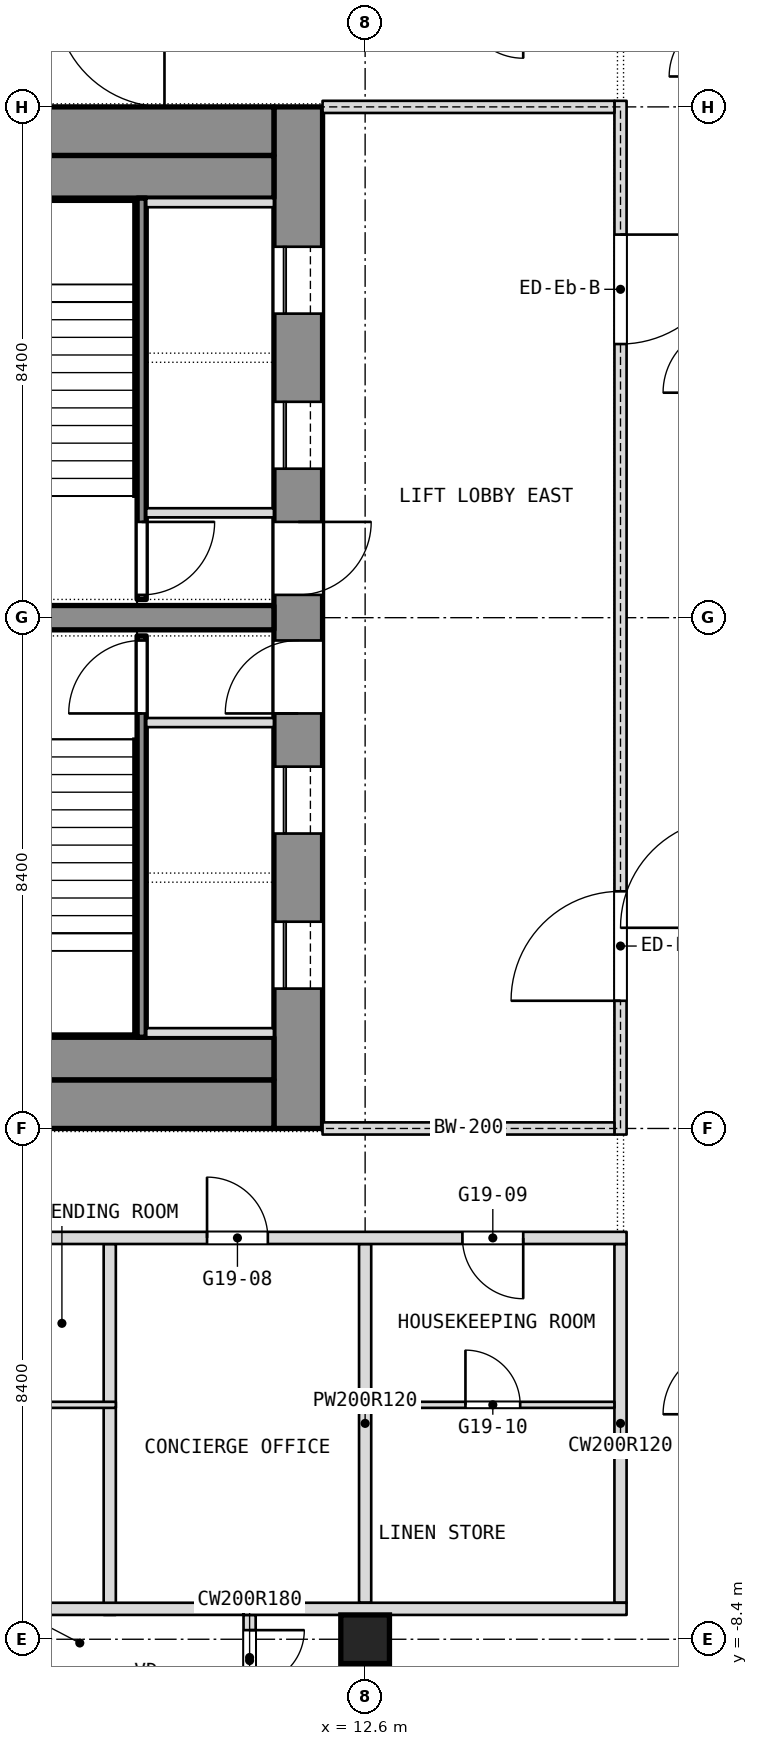
"""IFC4 building model, lengths in metres.
Left out: names, types, materials, properties, quantities, classifications, styles, units other than length and angle.
Written with IfcOpenShell. Run it as: python <this file> out.ifc"""

import sys

from ifc_helpers import new_model, si_unit, direction, frame, frame_2d, origin, origin_2d, place, context, subcontext, project, spatial, rectangle, extrude, element, fill, save


model = new_model("IFC4")
c1 = context("Model", 3, precision=1e-05, world=origin(), true_north=direction((0.0, 1.0)))
c2 = subcontext(c1, "Body", "Model", "MODEL_VIEW")
j1 = project(units=[si_unit("LENGTHUNIT", "METRE"), si_unit("PLANEANGLEUNIT", "RADIAN")], contexts=[c1])
p1 = place(None, origin())
s1 = spatial("IfcSite", under=j1, at=p1, CompositionType="ELEMENT")
p2 = place(p1, origin())
s2 = spatial("IfcBuilding", under=s1, at=p2, CompositionType="ELEMENT")
p3 = place(p2, frame((0.0, 0.0, 220.1)))
s3 = spatial("IfcBuildingStorey", under=s2, at=p3, CompositionType="ELEMENT", Elevation=220.1)
p4 = place(p3, frame((11.5, 0.0, 0.0), z_axis=(0.0, 0.0, 1.0), x_axis=(0.0, 1.0, 0.0)))
e1 = element("IfcWall", 1, at=p4, inside=s3, PredefinedType="SHEAR", context=c2, shape_type="SweptSolid", body=[
    extrude(rectangle(XDim=16.8, YDim=0.8, at=frame_2d((8.4, 0.0))), origin(), (0.0, 0.0, 1.0), 3.6),
])
p5 = place(p4, frame((2.3, 0.0, 0.0)))
e2 = element("IfcOpeningElement", 2, at=p5, cuts=e1, PredefinedType="OPENING", context=c2, shape_type="SweptSolid", body=[
    extrude(rectangle(XDim=1.1, YDim=2.1, at=frame_2d((0.55, 1.05))), frame((0.0, 0.4, 0.0), z_axis=(0.0, -1.0, 0.0), x_axis=(1.0, 0.0, 0.0)), (0.0, 0.0, 1.0), 0.8),
])
p6 = place(p4, frame((4.85, 0.0, 0.0)))
e3 = element("IfcOpeningElement", 3, at=p6, cuts=e1, PredefinedType="OPENING", context=c2, shape_type="SweptSolid", body=[
    extrude(rectangle(XDim=1.1, YDim=2.1, at=frame_2d((0.55, 1.05))), frame((0.0, 0.4, 0.0), z_axis=(0.0, -1.0, 0.0), x_axis=(1.0, 0.0, 0.0)), (0.0, 0.0, 1.0), 0.8),
])
p7 = place(p4, frame((6.825, 0.0, 0.0)))
e4 = element("IfcOpeningElement", 4, at=p7, cuts=e1, PredefinedType="OPENING", context=c2, shape_type="SweptSolid", body=[
    extrude(rectangle(XDim=1.2, YDim=2.1, at=frame_2d((0.6, 1.05))), frame((0.0, 0.4, 0.0), z_axis=(0.0, -1.0, 0.0), x_axis=(1.0, 0.0, 0.0)), (0.0, 0.0, 1.0), 0.8),
])
p8 = place(p4, frame((13.4, 0.0, 0.0)))
e5 = element("IfcOpeningElement", 5, at=p8, cuts=e1, PredefinedType="OPENING", context=c2, shape_type="SweptSolid", body=[
    extrude(rectangle(XDim=1.1, YDim=2.1, at=frame_2d((0.55, 1.05))), frame((0.0, 0.4, 0.0), z_axis=(0.0, -1.0, 0.0), x_axis=(1.0, 0.0, 0.0)), (0.0, 0.0, 1.0), 0.8),
])
p9 = place(p4, frame((10.85, 0.0, 0.0)))
e6 = element("IfcOpeningElement", 6, at=p9, cuts=e1, PredefinedType="OPENING", context=c2, shape_type="SweptSolid", body=[
    extrude(rectangle(XDim=1.1, YDim=2.1, at=frame_2d((0.55, 1.05))), frame((0.0, 0.4, 0.0), z_axis=(0.0, -1.0, 0.0), x_axis=(1.0, 0.0, 0.0)), (0.0, 0.0, 1.0), 0.8),
])
p10 = place(p4, frame((8.775, 0.0, 0.0)))
e7 = element("IfcOpeningElement", 7, at=p10, cuts=e1, PredefinedType="OPENING", context=c2, shape_type="SweptSolid", body=[
    extrude(rectangle(XDim=1.2, YDim=2.1, at=frame_2d((0.6, 1.05))), frame((0.0, 0.4, 0.0), z_axis=(0.0, -1.0, 0.0), x_axis=(1.0, 0.0, 0.0)), (0.0, 0.0, 1.0), 0.8),
])
for number, where, z_axis, x_axis in (
    (8, (-11.1, 0.4, 0.0), (0.0, 0.0, 1.0), (1.0, 0.0, 0.0)),
    (9, (-11.1, 16.4, 0.0), (0.0, 0.0, 1.0), (1.0, 0.0, 0.0)),
):
    element("IfcWall", number, at=place(p3, frame(where, z_axis=z_axis, x_axis=x_axis)), inside=s3, PredefinedType="SHEAR", context=c2, shape_type="SweptSolid", body=[
        extrude(rectangle(XDim=22.2, YDim=0.8, at=frame_2d((11.1, 0.0))), origin(), (0.0, 0.0, 1.0), 3.6),
    ])
p11 = place(p3, frame((4.4, 8.4, 0.0), z_axis=(0.0, 0.0, 1.0), x_axis=(1.0, 0.0, 0.0)))
e10 = element("IfcWall", 10, at=p11, inside=s3, PredefinedType="SHEAR", context=c2, shape_type="SweptSolid", body=[
    extrude(rectangle(XDim=6.7, YDim=0.4, at=frame_2d((3.35, 0.0))), origin(), (0.0, 0.0, 1.0), 3.6),
])
p12 = place(p3, frame((12.6, -8.4, 0.0), z_axis=(0.0, 0.0, 1.0), x_axis=(1.0, 0.0, 0.0)))
e11 = element("IfcColumn", 11, at=p12, inside=s3, PredefinedType="COLUMN", context=c2, shape_type="SweptSolid", body=[
    extrude(rectangle(XDim=0.8, YDim=0.8, at=origin_2d()), origin(), (0.0, 0.0, 1.0), 3.6),
])
for number, where, z_axis, x_axis in (
    (12, (16.8, -7.8, 0.0), (0.0, 0.0, 1.0), (0.0, 1.0, 0.0)),
    (13, (12.6, -7.8, 0.0), (0.0, 0.0, 1.0), (0.0, 1.0, 0.0)),
):
    element("IfcWall", number, at=place(p3, frame(where, z_axis=z_axis, x_axis=x_axis)), inside=s3, PredefinedType="PARTITIONING", context=c2, shape_type="SweptSolid", body=[
        extrude(rectangle(XDim=5.9, YDim=0.2, at=frame_2d((2.95, 0.0))), origin(), (0.0, 0.0, 1.0), 3.34),
    ])
p13 = place(p3, frame((10.7, -9.5, 0.0), z_axis=(0.0, 0.0, 1.0), x_axis=(0.0, 1.0, 0.0)))
e14 = element("IfcWall", 14, at=p13, inside=s3, PredefinedType="PARTITIONING", context=c2, shape_type="SweptSolid", body=[
    extrude(rectangle(XDim=1.5, YDim=0.2, at=frame_2d((0.75, 0.0))), origin(), (0.0, 0.0, 1.0), 3.34),
])
p14 = place(p13, frame((0.35, 0.0, 0.0)))
e15 = element("IfcOpeningElement", 15, at=p14, cuts=e14, PredefinedType="OPENING", context=c2, shape_type="SweptSolid", body=[
    extrude(rectangle(XDim=0.9, YDim=2.1, at=frame_2d((0.45, 1.05))), frame((0.0, 0.1, 0.0), z_axis=(0.0, -1.0, 0.0), x_axis=(1.0, 0.0, 0.0)), (0.0, 0.0, 1.0), 0.2),
])
p15 = place(p3, frame((8.4, -8.0, 0.0), z_axis=(0.0, 0.0, 1.0), x_axis=(0.0, 1.0, 0.0)))
e16 = element("IfcWall", 16, at=p15, inside=s3, PredefinedType="PARTITIONING", context=c2, shape_type="SweptSolid", body=[
    extrude(rectangle(XDim=6.1, YDim=0.2, at=frame_2d((3.05, 0.0))), origin(), (0.0, 0.0, 1.0), 3.34),
])
p16 = place(p3, frame((10.6, -7.9, 0.0), z_axis=(0.0, 0.0, 1.0), x_axis=(1.0, 0.0, 0.0)))
e17 = element("IfcWall", 17, at=p16, inside=s3, PredefinedType="PARTITIONING", context=c2, shape_type="SweptSolid", body=[
    extrude(rectangle(XDim=6.3, YDim=0.2, at=frame_2d((3.15, 0.0))), origin(), (0.0, 0.0, 1.0), 3.34),
])
p17 = place(p3, frame((7.2, -7.9, 0.0), z_axis=(0.0, 0.0, 1.0), x_axis=(1.0, 0.0, 0.0)))
e18 = element("IfcWall", 18, at=p17, inside=s3, PredefinedType="PARTITIONING", context=c2, shape_type="SweptSolid", body=[
    extrude(rectangle(XDim=3.4, YDim=0.2, at=frame_2d((1.7, 0.0))), origin(), (0.0, 0.0, 1.0), 3.34),
])
p18 = place(p3, frame((4.1, -4.545, 0.0), z_axis=(0.0, 0.0, 1.0), x_axis=(1.0, 0.0, 0.0)))
e19 = element("IfcWall", 19, at=p18, inside=s3, PredefinedType="PARTITIONING", context=c2, shape_type="SweptSolid", body=[
    extrude(rectangle(XDim=4.4, YDim=0.1, at=frame_2d((2.2, 0.0))), origin(), (0.0, 0.0, 1.0), 3.34),
])
p19 = place(p18, frame((1.75, 0.0, 0.0)))
e20 = element("IfcOpeningElement", 20, at=p19, cuts=e19, PredefinedType="OPENING", context=c2, shape_type="SweptSolid", body=[
    extrude(rectangle(XDim=0.9, YDim=2.1, at=frame_2d((0.45, 1.05))), frame((0.0, 0.05, 0.0), z_axis=(0.0, -1.0, 0.0), x_axis=(1.0, 0.0, 0.0)), (0.0, 0.0, 1.0), 0.1),
])
p20 = place(p3, frame((12.7, -4.545, 0.0), z_axis=(0.0, 0.0, 1.0), x_axis=(1.0, 0.0, 0.0)))
e21 = element("IfcWall", 21, at=p20, inside=s3, PredefinedType="PARTITIONING", context=c2, shape_type="SweptSolid", body=[
    extrude(rectangle(XDim=4.0, YDim=0.1, at=frame_2d((2.0, 0.0))), origin(), (0.0, 0.0, 1.0), 3.34),
])
p21 = place(p20, frame((1.55, 0.0, 0.0)))
e22 = element("IfcOpeningElement", 22, at=p21, cuts=e21, PredefinedType="OPENING", context=c2, shape_type="SweptSolid", body=[
    extrude(rectangle(XDim=0.9, YDim=2.1, at=frame_2d((0.45, 1.05))), frame((0.0, 0.05, 0.0), z_axis=(0.0, -1.0, 0.0), x_axis=(1.0, 0.0, 0.0)), (0.0, 0.0, 1.0), 0.1),
])
p22 = place(p3, frame((-16.9, -1.8, 0.0), z_axis=(0.0, 0.0, 1.0), x_axis=(1.0, 0.0, 0.0)))
e23 = element("IfcWall", 23, at=p22, inside=s3, PredefinedType="PARTITIONING", context=c2, shape_type="SweptSolid", body=[
    extrude(rectangle(XDim=33.8, YDim=0.2, at=frame_2d((16.9, 0.0))), origin(), (0.0, 0.0, 1.0), 3.34),
])
p23 = place(p22, frame((1.7, 0.0, 0.0)))
e24 = element("IfcOpeningElement", 24, at=p23, cuts=e23, PredefinedType="OPENING", context=c2, shape_type="SweptSolid", body=[
    extrude(rectangle(XDim=1.0, YDim=2.1, at=frame_2d((0.5, 1.05))), frame((0.0, 0.1, 0.0), z_axis=(0.0, -1.0, 0.0), x_axis=(1.0, 0.0, 0.0)), (0.0, 0.0, 1.0), 0.2),
])
p24 = place(p22, frame((5.9, 0.0, 0.0)))
e25 = element("IfcOpeningElement", 25, at=p24, cuts=e23, PredefinedType="OPENING", context=c2, shape_type="SweptSolid", body=[
    extrude(rectangle(XDim=1.0, YDim=2.1, at=frame_2d((0.5, 1.05))), frame((0.0, 0.1, 0.0), z_axis=(0.0, -1.0, 0.0), x_axis=(1.0, 0.0, 0.0)), (0.0, 0.0, 1.0), 0.2),
])
p25 = place(p22, frame((10.1, 0.0, 0.0)))
e26 = element("IfcOpeningElement", 26, at=p25, cuts=e23, PredefinedType="OPENING", context=c2, shape_type="SweptSolid", body=[
    extrude(rectangle(XDim=1.0, YDim=2.1, at=frame_2d((0.5, 1.05))), frame((0.0, 0.1, 0.0), z_axis=(0.0, -1.0, 0.0), x_axis=(1.0, 0.0, 0.0)), (0.0, 0.0, 1.0), 0.2),
])
p26 = place(p22, frame((22.7, 0.0, 0.0)))
e27 = element("IfcOpeningElement", 27, at=p26, cuts=e23, PredefinedType="OPENING", context=c2, shape_type="SweptSolid", body=[
    extrude(rectangle(XDim=1.0, YDim=2.1, at=frame_2d((0.5, 1.05))), frame((0.0, 0.1, 0.0), z_axis=(0.0, -1.0, 0.0), x_axis=(1.0, 0.0, 0.0)), (0.0, 0.0, 1.0), 0.2),
])
p27 = place(p22, frame((26.9, 0.0, 0.0)))
e28 = element("IfcOpeningElement", 28, at=p27, cuts=e23, PredefinedType="OPENING", context=c2, shape_type="SweptSolid", body=[
    extrude(rectangle(XDim=1.0, YDim=2.1, at=frame_2d((0.5, 1.05))), frame((0.0, 0.1, 0.0), z_axis=(0.0, -1.0, 0.0), x_axis=(1.0, 0.0, 0.0)), (0.0, 0.0, 1.0), 0.2),
])
p28 = place(p22, frame((31.1, 0.0, 0.0)))
e29 = element("IfcOpeningElement", 29, at=p28, cuts=e23, PredefinedType="OPENING", context=c2, shape_type="SweptSolid", body=[
    extrude(rectangle(XDim=1.0, YDim=2.1, at=frame_2d((0.5, 1.05))), frame((0.0, 0.1, 0.0), z_axis=(0.0, -1.0, 0.0), x_axis=(1.0, 0.0, 0.0)), (0.0, 0.0, 1.0), 0.2),
])
p29 = place(p22, frame((16.4, 0.0, 0.0)))
e30 = element("IfcOpeningElement", 30, at=p29, cuts=e23, PredefinedType="OPENING", context=c2, shape_type="SweptSolid", body=[
    extrude(rectangle(XDim=1.0, YDim=2.1, at=frame_2d((0.5, 1.05))), frame((0.0, 0.1, 0.0), z_axis=(0.0, -1.0, 0.0), x_axis=(1.0, 0.0, 0.0)), (0.0, 0.0, 1.0), 0.2),
])
for number, where, z_axis, x_axis in (
    (31, (-11.1, 1.15, 0.0), (0.0, 0.0, 1.0), (1.0, 0.0, 0.0)),
    (32, (-11.1, 15.65, 0.0), (0.0, 0.0, 1.0), (1.0, 0.0, 0.0)),
):
    element("IfcWall", number, at=place(p3, frame(where, z_axis=z_axis, x_axis=x_axis)), inside=s3, PredefinedType="PARTITIONING", context=c2, shape_type="SweptSolid", body=[
        extrude(rectangle(XDim=22.2, YDim=0.7, at=frame_2d((11.1, 0.0))), origin(), (0.0, 0.0, 1.0), 3.34),
    ])
p30 = place(p3, frame((8.925, 1.5, 0.0), z_axis=(0.0, 0.0, 1.0), x_axis=(0.0, 1.0, 0.0)))
e33 = element("IfcWall", 33, at=p30, inside=s3, PredefinedType="SHEAR", context=c2, shape_type="SweptSolid", body=[
    extrude(rectangle(XDim=6.6, YDim=0.15, at=frame_2d((3.3, 0.0))), origin(), (0.0, 0.0, 1.0), 3.34),
])
p31 = place(p30, frame((5.325, 0.0, 0.0)))
e34 = element("IfcOpeningElement", 34, at=p31, cuts=e33, PredefinedType="OPENING", context=c2, shape_type="SweptSolid", body=[
    extrude(rectangle(XDim=1.2, YDim=2.1, at=frame_2d((0.6, 1.05))), frame((0.0, 0.075, 0.0), z_axis=(0.0, -1.0, 0.0), x_axis=(1.0, 0.0, 0.0)), (0.0, 0.0, 1.0), 0.15),
])
for number, where, z_axis, x_axis in (
    (35, (9.0, 6.675, 0.0), (0.0, 0.0, 1.0), (1.0, 0.0, 0.0)),
    (36, (9.0, 1.575, 0.0), (0.0, 0.0, 1.0), (1.0, 0.0, 0.0)),
):
    element("IfcWall", number, at=place(p3, frame(where, z_axis=z_axis, x_axis=x_axis)), inside=s3, PredefinedType="SHEAR", context=c2, shape_type="SweptSolid", body=[
        extrude(rectangle(XDim=2.1, YDim=0.15, at=frame_2d((1.05, 0.0))), origin(), (0.0, 0.0, 1.0), 3.6),
    ])
p32 = place(p3, frame((8.925, 8.7, 0.0), z_axis=(0.0, 0.0, 1.0), x_axis=(0.0, 1.0, 0.0)))
e37 = element("IfcWall", 37, at=p32, inside=s3, PredefinedType="SHEAR", context=c2, shape_type="SweptSolid", body=[
    extrude(rectangle(XDim=6.6, YDim=0.15, at=frame_2d((3.3, 0.0))), origin(), (0.0, 0.0, 1.0), 3.34),
])
p33 = place(p32, frame((0.075, 0.0, 0.0)))
e38 = element("IfcOpeningElement", 38, at=p33, cuts=e37, PredefinedType="OPENING", context=c2, shape_type="SweptSolid", body=[
    extrude(rectangle(XDim=1.2, YDim=2.1, at=frame_2d((0.6, 1.05))), frame((0.0, 0.075, 0.0), z_axis=(0.0, -1.0, 0.0), x_axis=(1.0, 0.0, 0.0)), (0.0, 0.0, 1.0), 0.15),
])
for number, where, z_axis, x_axis in (
    (39, (9.0, 10.125, 0.0), (0.0, 0.0, 1.0), (1.0, 0.0, 0.0)),
    (40, (9.0, 15.225, 0.0), (0.0, 0.0, 1.0), (1.0, 0.0, 0.0)),
):
    element("IfcWall", number, at=place(p3, frame(where, z_axis=z_axis, x_axis=x_axis)), inside=s3, PredefinedType="SHEAR", context=c2, shape_type="SweptSolid", body=[
        extrude(rectangle(XDim=2.1, YDim=0.15, at=frame_2d((1.05, 0.0))), origin(), (0.0, 0.0, 1.0), 3.6),
    ])
p34 = place(p3, frame((16.8, -0.1, 0.0), z_axis=(0.0, 0.0, 1.0), x_axis=(0.0, 1.0, 0.0)))
e41 = element("IfcWall", 41, at=p34, inside=s3, PredefinedType="PARTITIONING", context=c2, shape_type="SweptSolid", body=[
    extrude(rectangle(XDim=17.0, YDim=0.2, at=frame_2d((8.5, 0.0))), origin(), (0.0, 0.0, 1.0), 3.34),
])
p35 = place(p34, frame((2.2, 0.0, 0.0)))
e42 = element("IfcOpeningElement", 42, at=p35, cuts=e41, PredefinedType="OPENING", context=c2, shape_type="SweptSolid", body=[
    extrude(rectangle(XDim=1.8, YDim=2.1, at=frame_2d((0.9, 1.05))), frame((0.0, 0.1, 0.0), z_axis=(0.0, -1.0, 0.0), x_axis=(1.0, 0.0, 0.0)), (0.0, 0.0, 1.0), 0.2),
])
p36 = place(p34, frame((13.0, 0.0, 0.0)))
e43 = element("IfcOpeningElement", 43, at=p36, cuts=e41, PredefinedType="OPENING", context=c2, shape_type="SweptSolid", body=[
    extrude(rectangle(XDim=1.8, YDim=2.1, at=frame_2d((0.9, 1.05))), frame((0.0, 0.1, 0.0), z_axis=(0.0, -1.0, 0.0), x_axis=(1.0, 0.0, 0.0)), (0.0, 0.0, 1.0), 0.2),
])
for number, where, z_axis, x_axis in (
    (44, (11.9, 0.0, 0.0), (0.0, 0.0, 1.0), (1.0, 0.0, 0.0)),
    (45, (11.9, 16.8, 0.0), (0.0, 0.0, 1.0), (1.0, 0.0, 0.0)),
):
    element("IfcWall", number, at=place(p3, frame(where, z_axis=z_axis, x_axis=x_axis)), inside=s3, PredefinedType="PARTITIONING", context=c2, shape_type="SweptSolid", body=[
        extrude(rectangle(XDim=4.8, YDim=0.2, at=frame_2d((2.4, 0.0))), origin(), (0.0, 0.0, 1.0), 2.94),
    ])
p37 = place(p14, origin())
e46 = element("IfcDoor", 46, at=p37, inside=s3, OperationType="SINGLE_SWING_RIGHT", PredefinedType="DOOR", context=c2, shape_type="SweptSolid", body=[
    extrude(rectangle(XDim=0.9, YDim=2.1, at=frame_2d((0.45, 1.05))), frame((0.0, 0.025, 0.0), z_axis=(0.0, -1.0, 0.0), x_axis=(1.0, 0.0, 0.0)), (0.0, 0.0, 1.0), 0.05),
])
fill(e15, e46)
p38 = place(p21, origin())
e47 = element("IfcDoor", 47, at=p38, inside=s3, OperationType="SINGLE_SWING_RIGHT", PredefinedType="DOOR", context=c2, shape_type="SweptSolid", body=[
    extrude(rectangle(XDim=0.9, YDim=2.1, at=frame_2d((0.45, 1.05))), frame((0.0, 0.025, 0.0), z_axis=(0.0, -1.0, 0.0), x_axis=(1.0, 0.0, 0.0)), (0.0, 0.0, 1.0), 0.05),
])
fill(e22, e47)
p39 = place(p27, origin())
e48 = element("IfcDoor", 48, at=p39, inside=s3, OperationType="SINGLE_SWING_LEFT", PredefinedType="DOOR", context=c2, shape_type="SweptSolid", body=[
    extrude(rectangle(XDim=1.0, YDim=2.1, at=frame_2d((0.5, 1.05))), frame((0.0, 0.025, 0.0), z_axis=(0.0, -1.0, 0.0), x_axis=(1.0, 0.0, 0.0)), (0.0, 0.0, 1.0), 0.05),
])
fill(e28, e48)
p40 = place(p28, origin())
e49 = element("IfcDoor", 49, at=p40, inside=s3, OperationType="SINGLE_SWING_LEFT", PredefinedType="DOOR", context=c2, shape_type="SweptSolid", body=[
    extrude(rectangle(XDim=1.0, YDim=2.1, at=frame_2d((0.5, 1.05))), frame((0.0, 0.025, 0.0), z_axis=(0.0, -1.0, 0.0), x_axis=(1.0, 0.0, 0.0)), (0.0, 0.0, 1.0), 0.05),
])
fill(e29, e49)
p41 = place(p5, origin())
e50 = element("IfcDoor", 50, at=p41, inside=s3, OperationType="SLIDING_TO_LEFT", PredefinedType="DOOR", context=c2, shape_type="SweptSolid", body=[
    extrude(rectangle(XDim=1.1, YDim=2.1, at=frame_2d((0.55, 1.05))), frame((0.0, 0.025, 0.0), z_axis=(0.0, -1.0, 0.0), x_axis=(1.0, 0.0, 0.0)), (0.0, 0.0, 1.0), 0.05),
])
fill(e2, e50)
p42 = place(p6, origin())
e51 = element("IfcDoor", 51, at=p42, inside=s3, OperationType="SLIDING_TO_LEFT", PredefinedType="DOOR", context=c2, shape_type="SweptSolid", body=[
    extrude(rectangle(XDim=1.1, YDim=2.1, at=frame_2d((0.55, 1.05))), frame((0.0, 0.025, 0.0), z_axis=(0.0, -1.0, 0.0), x_axis=(1.0, 0.0, 0.0)), (0.0, 0.0, 1.0), 0.05),
])
fill(e3, e51)
p43 = place(p7, origin())
e52 = element("IfcDoor", 52, at=p43, inside=s3, OperationType="SINGLE_SWING_LEFT", PredefinedType="DOOR", context=c2, shape_type="SweptSolid", body=[
    extrude(rectangle(XDim=1.2, YDim=2.1, at=frame_2d((0.6, 1.05))), frame((0.0, 0.025, 0.0), z_axis=(0.0, -1.0, 0.0), x_axis=(1.0, 0.0, 0.0)), (0.0, 0.0, 1.0), 0.05),
])
fill(e4, e52)
p44 = place(p31, origin())
e53 = element("IfcDoor", 53, at=p44, inside=s3, OperationType="SINGLE_SWING_LEFT", PredefinedType="DOOR", context=c2, shape_type="SweptSolid", body=[
    extrude(rectangle(XDim=1.2, YDim=2.1, at=frame_2d((0.6, 1.05))), frame((0.0, 0.025, 0.0), z_axis=(0.0, -1.0, 0.0), x_axis=(1.0, 0.0, 0.0)), (0.0, 0.0, 1.0), 0.05),
])
fill(e34, e53)
p45 = place(p8, origin())
e54 = element("IfcDoor", 54, at=p45, inside=s3, OperationType="SLIDING_TO_LEFT", PredefinedType="DOOR", context=c2, shape_type="SweptSolid", body=[
    extrude(rectangle(XDim=1.1, YDim=2.1, at=frame_2d((0.55, 1.05))), frame((0.0, 0.025, 0.0), z_axis=(0.0, -1.0, 0.0), x_axis=(1.0, 0.0, 0.0)), (0.0, 0.0, 1.0), 0.05),
])
fill(e5, e54)
p46 = place(p9, origin())
e55 = element("IfcDoor", 55, at=p46, inside=s3, OperationType="SLIDING_TO_LEFT", PredefinedType="DOOR", context=c2, shape_type="SweptSolid", body=[
    extrude(rectangle(XDim=1.1, YDim=2.1, at=frame_2d((0.55, 1.05))), frame((0.0, 0.025, 0.0), z_axis=(0.0, -1.0, 0.0), x_axis=(1.0, 0.0, 0.0)), (0.0, 0.0, 1.0), 0.05),
])
fill(e6, e55)
p47 = place(p10, origin())
e56 = element("IfcDoor", 56, at=p47, inside=s3, OperationType="SINGLE_SWING_LEFT", PredefinedType="DOOR", context=c2, shape_type="SweptSolid", body=[
    extrude(rectangle(XDim=1.2, YDim=2.1, at=frame_2d((0.6, 1.05))), frame((0.0, 0.025, 0.0), z_axis=(0.0, -1.0, 0.0), x_axis=(1.0, 0.0, 0.0)), (0.0, 0.0, 1.0), 0.05),
])
fill(e7, e56)
p48 = place(p33, origin())
e57 = element("IfcDoor", 57, at=p48, inside=s3, OperationType="SINGLE_SWING_LEFT", PredefinedType="DOOR", context=c2, shape_type="SweptSolid", body=[
    extrude(rectangle(XDim=1.2, YDim=2.1, at=frame_2d((0.6, 1.05))), frame((0.0, 0.025, 0.0), z_axis=(0.0, -1.0, 0.0), x_axis=(1.0, 0.0, 0.0)), (0.0, 0.0, 1.0), 0.05),
])
fill(e38, e57)
p49 = place(p35, origin())
e58 = element("IfcDoor", 58, at=p49, inside=s3, OperationType="DOUBLE_DOOR_SINGLE_SWING", PredefinedType="DOOR", context=c2, shape_type="SweptSolid", body=[
    extrude(rectangle(XDim=1.8, YDim=2.1, at=frame_2d((0.9, 1.05))), frame((0.0, 0.025, 0.0), z_axis=(0.0, -1.0, 0.0), x_axis=(1.0, 0.0, 0.0)), (0.0, 0.0, 1.0), 0.05),
])
fill(e42, e58)
p50 = place(p36, origin())
e59 = element("IfcDoor", 59, at=p50, inside=s3, OperationType="DOUBLE_DOOR_SINGLE_SWING", PredefinedType="DOOR", context=c2, shape_type="SweptSolid", body=[
    extrude(rectangle(XDim=1.8, YDim=2.1, at=frame_2d((0.9, 1.05))), frame((0.0, 0.025, 0.0), z_axis=(0.0, -1.0, 0.0), x_axis=(1.0, 0.0, 0.0)), (0.0, 0.0, 1.0), 0.05),
])
fill(e43, e59)
save(model, sys.argv[1])
